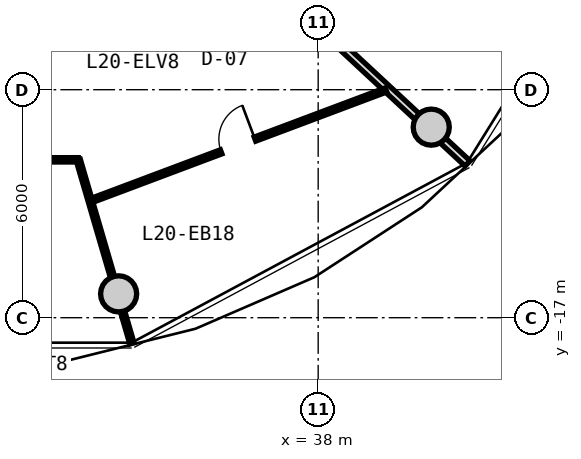
"""IFC4 building model, lengths in metres.
Left out: names, types, materials, properties, quantities, classifications, styles, units other than length and angle.
Written with IfcOpenShell. Run it as: python <this file> out.ifc"""

import sys

from ifc_helpers import new_model, si_unit, direction, frame, frame_2d, origin, origin_2d, place, context, subcontext, project, spatial, rectangle, circle, extrude, source, transform, mapped, element, fill, save


model = new_model("IFC4")
c1 = context("Model", 3, precision=1e-05, world=origin(), true_north=direction((0.0, 1.0)))
c2 = subcontext(c1, "Body", "Model", "MODEL_VIEW")
j1 = project(units=[si_unit("LENGTHUNIT", "METRE"), si_unit("PLANEANGLEUNIT", "RADIAN")], contexts=[c1])
p1 = place(None, origin())
s1 = spatial("IfcSite", under=j1, at=p1, CompositionType="ELEMENT")
p2 = place(p1, origin())
s2 = spatial("IfcBuilding", under=s1, at=p2, CompositionType="ELEMENT")
p3 = place(p2, frame((0.0, 0.0, 67.35)))
s3 = spatial("IfcBuildingStorey", under=s2, at=p3, CompositionType="ELEMENT", Elevation=67.35)
m1 = source(origin(), c2, "Body", "SweptSolid", [
    extrude(circle(Radius=0.475, at=origin_2d()), origin(), (0.0, 0.0, 1.0), 3.05),
])
for number, where, z_axis, x_axis in (
    (1, (32.749, -16.373, 0.0), (0.0, 0.0, 1.0), (1.0, 0.0, 0.0)),
    (2, (40.975, -11.985, 0.0), (0.0, 0.0, 1.0), (1.0, 0.0, 0.0)),
):
    element("IfcColumn", number, at=place(p3, frame(where, z_axis=z_axis, x_axis=x_axis)), inside=s3, PredefinedType="COLUMN", context=c2, shape_type="MappedRepresentation", body=[
        mapped(m1, transform((0.0, 0.0, 0.0), x_axis=(1.0, 0.0, 0.0), y_axis=(0.0, 1.0, 0.0), z_axis=(0.0, 0.0, 1.0), scale=1.0)),
    ])
m2 = source(origin(), c2, "Body", "SweptSolid", [
    extrude(rectangle(XDim=7.435, YDim=0.19, at=frame_2d((3.717, 0.0))), origin(), (0.0, 0.0, 1.0), 2.225),
])
p4 = place(p3, frame((36.483, -7.88, 0.0), z_axis=(0.0, 0.0, 1.0), x_axis=(0.732651956848, -0.680603489652, 0.0)))
e3 = element("IfcWall", 3, at=p4, inside=s3, PredefinedType="PARTITIONING", context=c2, shape_type="MappedRepresentation", body=[
    mapped(m2, transform((0.0, 0.0, 0.0), x_axis=(1.0, 0.0, 0.0), y_axis=(0.0, 1.0, 0.0), z_axis=(0.0, 0.0, 1.0), scale=1.0)),
])
m3 = source(origin(), c2, "Body", "SweptSolid", [
    extrude(rectangle(XDim=8.32, YDim=0.115, at=frame_2d((4.16, 0.0))), origin(), (0.0, 0.0, 1.0), 2.775),
])
p5 = place(p3, frame((31.997, -13.93, 0.0), z_axis=(0.0, 0.0, 1.0), x_axis=(0.936180763098, 0.351518959382, 0.0)))
e4 = element("IfcWall", 4, at=p5, inside=s3, PredefinedType="PARTITIONING", context=c2, shape_type="MappedRepresentation", body=[
    mapped(m3, transform((0.0, 0.0, 0.0), x_axis=(1.0, 0.0, 0.0), y_axis=(0.0, 1.0, 0.0), z_axis=(0.0, 0.0, 1.0), scale=1.0)),
])
p6 = place(p5, frame((3.685, 0.0, 0.0)))
e5 = element("IfcOpeningElement", 5, at=p6, cuts=e4, PredefinedType="OPENING", context=c2, shape_type="SweptSolid", body=[
    extrude(rectangle(XDim=0.95, YDim=2.1, at=frame_2d((0.475, 1.05))), frame((0.0, 0.067, 0.0), z_axis=(0.0, -1.0, 0.0), x_axis=(1.0, 0.0, 0.0)), (0.0, 0.0, 1.0), 0.135),
])
m4 = source(origin(), c2, "Body", "SweptSolid", [
    extrude(rectangle(XDim=5.031, YDim=0.115, at=frame_2d((2.515, 0.0))), origin(), (0.0, 0.0, 1.0), 2.225),
])
p7 = place(p3, frame((31.687, -12.848, 0.0), z_axis=(0.0, 0.0, 1.0), x_axis=(0.280657788738, -0.959807900374, 0.0)))
e6 = element("IfcWall", 6, at=p7, inside=s3, PredefinedType="PARTITIONING", context=c2, shape_type="MappedRepresentation", body=[
    mapped(m4, transform((0.0, 0.0, 0.0), x_axis=(1.0, 0.0, 0.0), y_axis=(0.0, 1.0, 0.0), z_axis=(0.0, 0.0, 1.0), scale=1.0)),
])
m5 = source(origin(), c2, "Body", "SweptSolid", [
    extrude(rectangle(XDim=3.686, YDim=0.115, at=frame_2d((1.843, 0.0))), origin(), (0.0, 0.0, 1.0), 2.775),
])
p8 = place(p3, frame((28.0, -12.848, 0.0), z_axis=(0.0, 0.0, 1.0), x_axis=(0.999999780653, 0.000662339237, 0.0)))
e7 = element("IfcWall", 7, at=p8, inside=s3, PredefinedType="PARTITIONING", context=c2, shape_type="MappedRepresentation", body=[
    mapped(m5, transform((0.0, 0.0, 0.0), x_axis=(1.0, 0.0, 0.0), y_axis=(0.0, 1.0, 0.0), z_axis=(0.0, 0.0, 1.0), scale=1.0)),
])
m6 = source(origin(), c2, "Body", "SweptSolid", [
    extrude(rectangle(XDim=0.95, YDim=2.1, at=frame_2d((0.475, 1.05))), frame((0.0, 0.025, 0.0), z_axis=(0.0, -1.0, 0.0), x_axis=(1.0, 0.0, 0.0)), (0.0, 0.0, 1.0), 0.05),
])
p9 = place(p6, origin())
e8 = element("IfcDoor", 8, at=p9, inside=s3, OperationType="SINGLE_SWING_RIGHT", PredefinedType="DOOR", context=c2, shape_type="MappedRepresentation", body=[
    mapped(m6, transform((0.0, 0.0, 0.0), x_axis=(1.0, 0.0, 0.0), y_axis=(0.0, 1.0, 0.0), z_axis=(0.0, 0.0, 1.0), scale=1.0)),
])
fill(e5, e8)
save(model, sys.argv[1])
